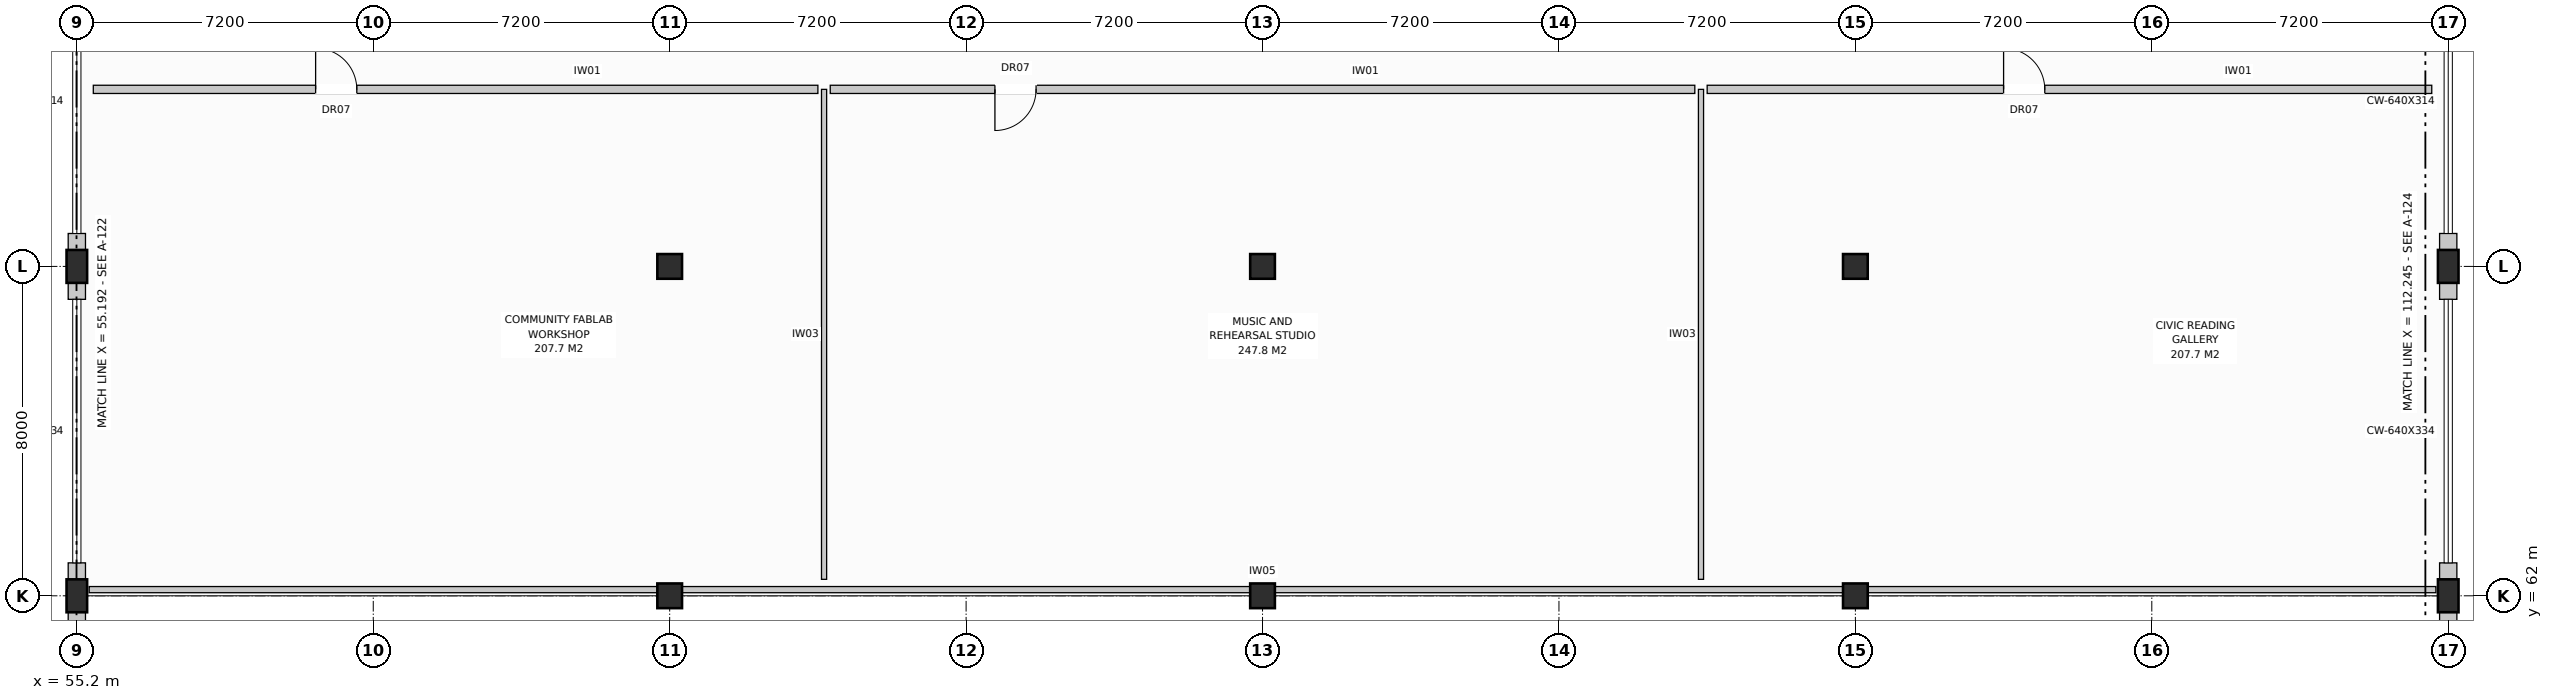
"""IFC4 building model, lengths in metres.
Left out: names, types, materials, properties, quantities, classifications, styles, units other than length and angle.
Written with IfcOpenShell. Run it as: python <this file> out.ifc"""

import sys

from ifc_helpers import new_model, si_unit, direction, frame, frame_2d, origin, origin_with_axes, origin_2d, place, context, subcontext, project, spatial, rectangle, circle, extrude, element, fill, save


model = new_model("IFC4")
c1 = context("Model", 3, precision=1e-05, world=origin(), true_north=direction((0.0, 1.0)))
c2 = subcontext(c1, "Body", "Model", "MODEL_VIEW")
j1 = project(units=[si_unit("LENGTHUNIT", "METRE"), si_unit("PLANEANGLEUNIT", "RADIAN")], contexts=[c1])
p1 = place(None, origin())
s1 = spatial("IfcSite", under=j1, at=p1, CompositionType="ELEMENT")
p2 = place(p1, origin())
s2 = spatial("IfcBuilding", under=s1, at=p2, CompositionType="ELEMENT")
p3 = place(p2, frame((0.0, 0.0, 4.4)))
s3 = spatial("IfcBuildingStorey", under=s2, at=p3, CompositionType="ELEMENT", Elevation=4.4)
for number, where, z_axis, x_axis in (
    (1, (55.2, 62.0, 0.0), (0.0, 0.0, 1.0), (1.0, 0.0, 0.0)),
    (2, (55.2, 70.0, 0.0), (0.0, 0.0, 1.0), (1.0, 0.0, 0.0)),
):
    element("IfcColumn", number, at=place(p3, frame(where, z_axis=z_axis, x_axis=x_axis)), inside=s3, PredefinedType="COLUMN", context=c2, shape_type="SweptSolid", body=[
        extrude(rectangle(XDim=0.5, YDim=0.8, at=origin_2d()), origin(), (0.0, 0.0, 1.0), 3.6),
    ])
for number, where, z_axis, x_axis in (
    (3, (69.6, 62.0, 0.0), (0.0, 0.0, 1.0), (1.0, 0.0, 0.0)),
    (4, (69.6, 70.0, 0.0), (0.0, 0.0, 1.0), (1.0, 0.0, 0.0)),
):
    element("IfcColumn", number, at=place(p3, frame(where, z_axis=z_axis, x_axis=x_axis)), inside=s3, PredefinedType="COLUMN", context=c2, shape_type="SweptSolid", body=[
        extrude(circle(Radius=0.3, at=origin_2d()), origin(), (0.0, 0.0, 1.0), 3.6),
    ])
for number, where, z_axis, x_axis in (
    (5, (84.0, 62.0, 0.0), (0.0, 0.0, 1.0), (1.0, 0.0, 0.0)),
    (6, (84.0, 70.0, 0.0), (0.0, 0.0, 1.0), (1.0, 0.0, 0.0)),
):
    element("IfcColumn", number, at=place(p3, frame(where, z_axis=z_axis, x_axis=x_axis)), inside=s3, PredefinedType="COLUMN", context=c2, shape_type="SweptSolid", body=[
        extrude(rectangle(XDim=0.6, YDim=0.6, at=origin_2d()), origin(), (0.0, 0.0, 1.0), 3.6),
    ])
for number, where, z_axis, x_axis in (
    (7, (98.4, 62.0, 0.0), (0.0, 0.0, 1.0), (1.0, 0.0, 0.0)),
    (8, (98.4, 70.0, 0.0), (0.0, 0.0, 1.0), (1.0, 0.0, 0.0)),
):
    element("IfcColumn", number, at=place(p3, frame(where, z_axis=z_axis, x_axis=x_axis)), inside=s3, PredefinedType="COLUMN", context=c2, shape_type="SweptSolid", body=[
        extrude(circle(Radius=0.3, at=origin_2d()), origin(), (0.0, 0.0, 1.0), 3.6),
    ])
for number, where, z_axis, x_axis in (
    (9, (112.8, 62.0, 0.0), (0.0, 0.0, 1.0), (1.0, 0.0, 0.0)),
    (10, (112.8, 70.0, 0.0), (0.0, 0.0, 1.0), (1.0, 0.0, 0.0)),
):
    element("IfcColumn", number, at=place(p3, frame(where, z_axis=z_axis, x_axis=x_axis)), inside=s3, PredefinedType="COLUMN", context=c2, shape_type="SweptSolid", body=[
        extrude(rectangle(XDim=0.5, YDim=0.8, at=origin_2d()), origin(), (0.0, 0.0, 1.0), 3.6),
    ])
p4 = place(p3, frame((55.2, 61.2, -0.28), z_axis=(0.0, 0.0, 1.0), x_axis=(0.0, 1.0, 0.0)))
e11 = element("IfcWall", 11, at=p4, inside=s3, PredefinedType="STANDARD", context=c2, shape_type="SweptSolid", body=[
    extrude(rectangle(XDim=0.8, YDim=0.42, at=frame_2d((0.4, 0.0))), origin(), (0.0, 0.0, 1.0), 3.62),
])
p5 = place(p3, frame((55.2, 62.0, 0.0), z_axis=(0.0, 0.0, 1.0), x_axis=(0.0, 1.0, 0.0)))
e12 = element("IfcWall", 12, at=p5, inside=s3, PredefinedType="STANDARD", context=c2, shape_type="SweptSolid", body=[
    extrude(rectangle(XDim=0.8, YDim=0.42, at=frame_2d((0.4, 0.0))), origin(), (0.0, 0.0, 1.0), 3.34),
])
p6 = place(p3, frame((55.2, 69.2, 0.0), z_axis=(0.0, 0.0, 1.0), x_axis=(0.0, 1.0, 0.0)))
e13 = element("IfcWall", 13, at=p6, inside=s3, PredefinedType="STANDARD", context=c2, shape_type="SweptSolid", body=[
    extrude(rectangle(XDim=1.6, YDim=0.42, at=frame_2d((0.8, 0.0))), origin(), (0.0, 0.0, 1.0), 3.145),
])
p7 = place(p3, frame((112.8, 61.2, -0.28), z_axis=(0.0, 0.0, 1.0), x_axis=(0.0, 1.0, 0.0)))
e14 = element("IfcWall", 14, at=p7, inside=s3, PredefinedType="STANDARD", context=c2, shape_type="SweptSolid", body=[
    extrude(rectangle(XDim=0.8, YDim=0.42, at=frame_2d((0.4, 0.0))), origin(), (0.0, 0.0, 1.0), 3.62),
])
p8 = place(p3, frame((112.8, 62.0, 0.0), z_axis=(0.0, 0.0, 1.0), x_axis=(0.0, 1.0, 0.0)))
e15 = element("IfcWall", 15, at=p8, inside=s3, PredefinedType="STANDARD", context=c2, shape_type="SweptSolid", body=[
    extrude(rectangle(XDim=0.8, YDim=0.42, at=frame_2d((0.4, 0.0))), origin(), (0.0, 0.0, 1.0), 3.34),
])
p9 = place(p3, frame((112.8, 69.2, 0.0), z_axis=(0.0, 0.0, 1.0), x_axis=(0.0, 1.0, 0.0)))
e16 = element("IfcWall", 16, at=p9, inside=s3, PredefinedType="STANDARD", context=c2, shape_type="SweptSolid", body=[
    extrude(rectangle(XDim=1.6, YDim=0.42, at=frame_2d((0.8, 0.0))), origin(), (0.0, 0.0, 1.0), 3.145),
])
p10 = place(p3, frame((55.6, 74.3, 0.0), z_axis=(0.0, 0.0, 1.0), x_axis=(1.0, 0.0, 0.0)))
e17 = element("IfcWall", 17, at=p10, inside=s3, PredefinedType="PARTITIONING", context=c2, shape_type="SweptSolid", body=[
    extrude(rectangle(XDim=17.6, YDim=0.2, at=frame_2d((8.8, 0.0))), origin(), (0.0, 0.0, 1.0), 3.33),
])
p11 = place(p10, frame((5.4, 0.0, 0.0)))
e18 = element("IfcOpeningElement", 18, at=p11, cuts=e17, PredefinedType="OPENING", context=c2, shape_type="SweptSolid", body=[
    extrude(rectangle(XDim=1.0, YDim=2.15, at=frame_2d((0.5, 1.075))), frame((0.0, 0.112, 0.0), z_axis=(0.0, -1.0, 0.0), x_axis=(1.0, 0.0, 0.0)), (0.0, 0.0, 1.0), 0.224),
])
p12 = place(p3, frame((73.5, 74.3, 0.0), z_axis=(0.0, 0.0, 1.0), x_axis=(1.0, 0.0, 0.0)))
e19 = element("IfcWall", 19, at=p12, inside=s3, PredefinedType="PARTITIONING", context=c2, shape_type="SweptSolid", body=[
    extrude(rectangle(XDim=21.0, YDim=0.2, at=frame_2d((10.5, 0.0))), origin(), (0.0, 0.0, 1.0), 3.33),
])
p13 = place(p12, frame((4.0, 0.0, 0.0)))
e20 = element("IfcOpeningElement", 20, at=p13, cuts=e19, PredefinedType="OPENING", context=c2, shape_type="SweptSolid", body=[
    extrude(rectangle(XDim=1.0, YDim=2.15, at=frame_2d((0.5, 1.075))), frame((0.0, 0.112, 0.0), z_axis=(0.0, -1.0, 0.0), x_axis=(1.0, 0.0, 0.0)), (0.0, 0.0, 1.0), 0.224),
])
p14 = place(p3, frame((94.8, 74.3, 0.0), z_axis=(0.0, 0.0, 1.0), x_axis=(1.0, 0.0, 0.0)))
e21 = element("IfcWall", 21, at=p14, inside=s3, PredefinedType="PARTITIONING", context=c2, shape_type="SweptSolid", body=[
    extrude(rectangle(XDim=17.6, YDim=0.2, at=frame_2d((8.8, 0.0))), origin(), (0.0, 0.0, 1.0), 3.33),
])
p15 = place(p14, frame((7.2, 0.0, 0.0)))
e22 = element("IfcOpeningElement", 22, at=p15, cuts=e21, PredefinedType="OPENING", context=c2, shape_type="SweptSolid", body=[
    extrude(rectangle(XDim=1.0, YDim=2.15, at=frame_2d((0.5, 1.075))), frame((0.0, 0.112, 0.0), z_axis=(0.0, -1.0, 0.0), x_axis=(1.0, 0.0, 0.0)), (0.0, 0.0, 1.0), 0.224),
])
for number, where, z_axis, x_axis in (
    (23, (73.35, 62.4, 0.0), (0.0, 0.0, 1.0), (0.0, 1.0, 0.0)),
    (24, (94.65, 62.4, 0.0), (0.0, 0.0, 1.0), (0.0, 1.0, 0.0)),
):
    element("IfcWall", number, at=place(p3, frame(where, z_axis=z_axis, x_axis=x_axis)), inside=s3, PredefinedType="PARTITIONING", context=c2, shape_type="SweptSolid", body=[
        extrude(rectangle(XDim=11.9, YDim=0.125, at=frame_2d((5.95, 0.0))), origin(), (0.0, 0.0, 1.0), 3.33),
    ])
p16 = place(p3, frame((55.5, 62.15, 0.0), z_axis=(0.0, 0.0, 1.0), x_axis=(1.0, 0.0, 0.0)))
e25 = element("IfcWall", 25, at=p16, inside=s3, PredefinedType="PARTITIONING", context=c2, shape_type="SweptSolid", body=[
    extrude(rectangle(XDim=57.0, YDim=0.15, at=frame_2d((28.5, 0.0))), origin(), (0.0, 0.0, 1.0), 3.33),
])
p17 = place(p11, origin_with_axes())
e26 = element("IfcDoor", 26, at=p17, inside=s3, OperationType="SINGLE_SWING_LEFT", PredefinedType="DOOR", context=c2, shape_type="SweptSolid", body=[
    extrude(rectangle(XDim=1.0, YDim=2.15, at=frame_2d((0.5, 1.075))), frame((0.0, 0.025, 0.0), z_axis=(0.0, -1.0, 0.0), x_axis=(1.0, 0.0, 0.0)), (0.0, 0.0, 1.0), 0.05),
])
fill(e18, e26)
p18 = place(p13, frame((1.0, 0.0, 0.0), z_axis=(0.0, 0.0, 1.0), x_axis=(-1.0, 0.0, 0.0)))
e27 = element("IfcDoor", 27, at=p18, inside=s3, OperationType="SINGLE_SWING_LEFT", PredefinedType="DOOR", context=c2, shape_type="SweptSolid", body=[
    extrude(rectangle(XDim=1.0, YDim=2.15, at=frame_2d((0.5, 1.075))), frame((0.0, 0.025, 0.0), z_axis=(0.0, -1.0, 0.0), x_axis=(1.0, 0.0, 0.0)), (0.0, 0.0, 1.0), 0.05),
])
fill(e20, e27)
p19 = place(p15, origin_with_axes())
e28 = element("IfcDoor", 28, at=p19, inside=s3, OperationType="SINGLE_SWING_LEFT", PredefinedType="DOOR", context=c2, shape_type="SweptSolid", body=[
    extrude(rectangle(XDim=1.0, YDim=2.15, at=frame_2d((0.5, 1.075))), frame((0.0, 0.025, 0.0), z_axis=(0.0, -1.0, 0.0), x_axis=(1.0, 0.0, 0.0)), (0.0, 0.0, 1.0), 0.05),
])
fill(e22, e28)
save(model, sys.argv[1])
